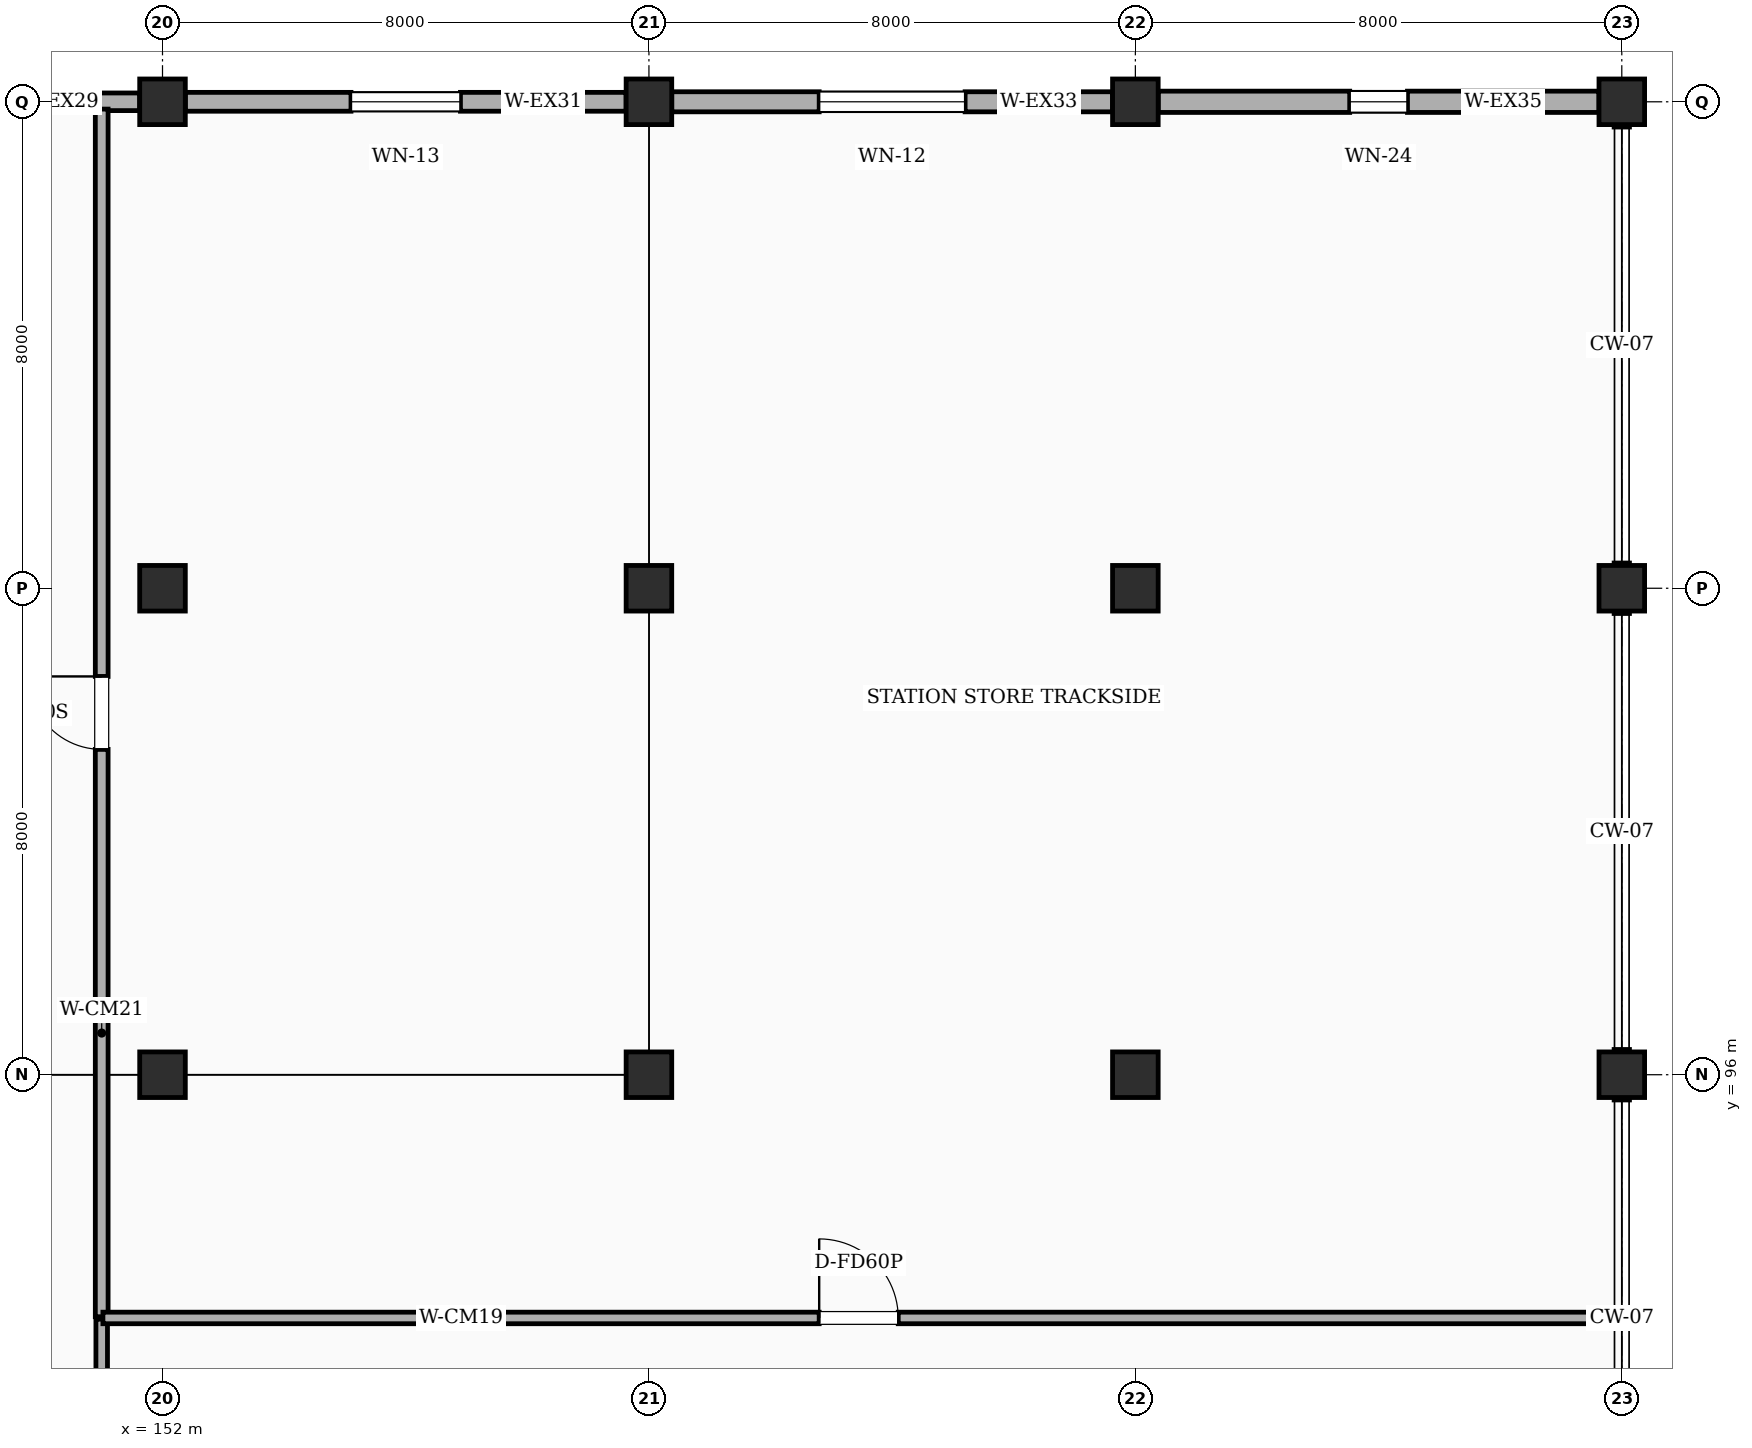
"""IFC4 building model, lengths in metres.
Left out: names, types, materials, properties, quantities, classifications, styles, units other than length and angle.
Written with IfcOpenShell. Run it as: python <this file> out.ifc"""

import sys

from ifc_helpers import new_model, si_unit, direction, frame, frame_2d, origin, origin_2d, place, context, subcontext, project, spatial, rectangle, extrude, element, fill, save


model = new_model("IFC4")
c1 = context("Model", 3, precision=1e-05, world=origin(), true_north=direction((0.0, 1.0)))
c2 = subcontext(c1, "Body", "Model", "MODEL_VIEW")
j1 = project(units=[si_unit("LENGTHUNIT", "METRE"), si_unit("PLANEANGLEUNIT", "RADIAN")], contexts=[c1])
p1 = place(None, origin())
s1 = spatial("IfcSite", under=j1, at=p1, CompositionType="ELEMENT")
p2 = place(p1, origin())
s2 = spatial("IfcBuilding", under=s1, at=p2, CompositionType="ELEMENT")
p3 = place(p2, origin())
s3 = spatial("IfcBuildingStorey", under=s2, at=p3, CompositionType="ELEMENT", Elevation=0.0)
for number, where, z_axis, x_axis in (
    (1, (152.0, 96.0, 0.0), (0.0, 0.0, 1.0), (1.0, 0.0, 0.0)),
    (2, (152.0, 104.0, 0.0), (0.0, 0.0, 1.0), (1.0, 0.0, 0.0)),
    (3, (152.0, 112.0, 0.0), (0.0, 0.0, 1.0), (1.0, 0.0, 0.0)),
    (4, (160.0, 96.0, 0.0), (0.0, 0.0, 1.0), (1.0, 0.0, 0.0)),
    (5, (160.0, 104.0, 0.0), (0.0, 0.0, 1.0), (1.0, 0.0, 0.0)),
    (6, (160.0, 112.0, 0.0), (0.0, 0.0, 1.0), (1.0, 0.0, 0.0)),
    (7, (168.0, 96.0, 0.0), (0.0, 0.0, 1.0), (1.0, 0.0, 0.0)),
    (8, (168.0, 104.0, 0.0), (0.0, 0.0, 1.0), (1.0, 0.0, 0.0)),
    (9, (168.0, 112.0, 0.0), (0.0, 0.0, 1.0), (1.0, 0.0, 0.0)),
    (10, (176.0, 96.0, 0.0), (0.0, 0.0, 1.0), (1.0, 0.0, 0.0)),
    (11, (176.0, 104.0, 0.0), (0.0, 0.0, 1.0), (1.0, 0.0, 0.0)),
    (12, (176.0, 112.0, 0.0), (0.0, 0.0, 1.0), (1.0, 0.0, 0.0)),
):
    element("IfcColumn", number, at=place(p3, frame(where, z_axis=z_axis, x_axis=x_axis)), inside=s3, PredefinedType="COLUMN", context=c2, shape_type="SweptSolid", body=[
        extrude(rectangle(XDim=0.75, YDim=0.75, at=origin_2d()), origin(), (0.0, 0.0, 1.0), 5.4),
    ])
p4 = place(p3, frame((175.625, 112.0, 0.0), z_axis=(0.0, 0.0, 1.0), x_axis=(-1.0, 0.0, 0.0)))
e13 = element("IfcWall", 13, at=p4, inside=s3, PredefinedType="STANDARD", context=c2, shape_type="SweptSolid", body=[
    extrude(rectangle(XDim=7.25, YDim=0.35, at=frame_2d((3.625, 0.0))), origin(), (0.0, 0.0, 1.0), 5.1),
])
p5 = place(p4, frame((3.15, 0.0, 0.95)))
e14 = element("IfcOpeningElement", 14, at=p5, cuts=e13, PredefinedType="OPENING", context=c2, shape_type="SweptSolid", body=[
    extrude(rectangle(XDim=0.95, YDim=2.1, at=frame_2d((0.475, 1.05))), frame((0.0, 0.185, 0.0), z_axis=(0.0, -1.0, 0.0), x_axis=(1.0, 0.0, 0.0)), (0.0, 0.0, 1.0), 0.37),
])
p6 = place(p3, frame((167.625, 112.0, 0.0), z_axis=(0.0, 0.0, 1.0), x_axis=(-1.0, 0.0, 0.0)))
e15 = element("IfcWall", 15, at=p6, inside=s3, PredefinedType="STANDARD", context=c2, shape_type="SweptSolid", body=[
    extrude(rectangle(XDim=7.25, YDim=0.33, at=frame_2d((3.625, 0.0))), origin(), (0.0, 0.0, 1.0), 5.1),
])
p7 = place(p6, frame((2.425, 0.0, 0.95)))
e16 = element("IfcOpeningElement", 16, at=p7, cuts=e15, PredefinedType="OPENING", context=c2, shape_type="SweptSolid", body=[
    extrude(rectangle(XDim=2.4, YDim=1.85, at=frame_2d((1.2, 0.925))), frame((0.0, 0.175, 0.0), z_axis=(0.0, -1.0, 0.0), x_axis=(1.0, 0.0, 0.0)), (0.0, 0.0, 1.0), 0.35),
])
p8 = place(p3, frame((159.625, 112.0, 0.0), z_axis=(0.0, 0.0, 1.0), x_axis=(-1.0, 0.0, 0.0)))
e17 = element("IfcWall", 17, at=p8, inside=s3, PredefinedType="STANDARD", context=c2, shape_type="SweptSolid", body=[
    extrude(rectangle(XDim=7.25, YDim=0.31, at=frame_2d((3.625, 0.0))), origin(), (0.0, 0.0, 1.0), 5.1),
])
p9 = place(p8, frame((2.725, 0.0, 0.95)))
e18 = element("IfcOpeningElement", 18, at=p9, cuts=e17, PredefinedType="OPENING", context=c2, shape_type="SweptSolid", body=[
    extrude(rectangle(XDim=1.8, YDim=1.85, at=frame_2d((0.9, 0.925))), frame((0.0, 0.165, 0.0), z_axis=(0.0, -1.0, 0.0), x_axis=(1.0, 0.0, 0.0)), (0.0, 0.0, 1.0), 0.33),
])
p10 = place(p3, frame((151.625, 112.0, 0.0), z_axis=(0.0, 0.0, 1.0), x_axis=(-1.0, 0.0, 0.0)))
e19 = element("IfcWall", 19, at=p10, inside=s3, PredefinedType="STANDARD", context=c2, shape_type="SweptSolid", body=[
    extrude(rectangle(XDim=6.2, YDim=0.29, at=frame_2d((3.1, 0.0))), origin(), (0.0, 0.0, 1.0), 5.1),
])
p11 = place(p10, frame((2.625, 0.0, 0.95)))
e20 = element("IfcOpeningElement", 20, at=p11, cuts=e19, PredefinedType="OPENING", context=c2, shape_type="SweptSolid", body=[
    extrude(rectangle(XDim=0.95, YDim=2.1, at=frame_2d((0.475, 1.05))), frame((0.0, 0.155, 0.0), z_axis=(0.0, -1.0, 0.0), x_axis=(1.0, 0.0, 0.0)), (0.0, 0.0, 1.0), 0.31),
])
p12 = place(p3, frame((151.0, 64.02, 0.0), z_axis=(0.0, 0.0, 1.0), x_axis=(0.0, 1.0, 0.0)))
e21 = element("IfcWall", 21, at=p12, inside=s3, PredefinedType="SOLIDWALL", context=c2, shape_type="SweptSolid", body=[
    extrude(rectangle(XDim=27.96, YDim=0.19, at=frame_2d((13.98, 0.0))), origin(), (0.0, 0.0, 1.0), 4.27),
])
p13 = place(p12, frame((10.131, 0.0, 0.0)))
e22 = element("IfcOpeningElement", 22, at=p13, cuts=e21, PredefinedType="OPENING", context=c2, shape_type="SweptSolid", body=[
    extrude(rectangle(XDim=1.3, YDim=2.2, at=frame_2d((0.65, 1.1))), frame((0.0, 0.105, 0.0), z_axis=(0.0, -1.0, 0.0), x_axis=(1.0, 0.0, 0.0)), (0.0, 0.0, 1.0), 0.21),
])
p14 = place(p3, frame((151.0, 92.02, 0.0), z_axis=(0.0, 0.0, 1.0), x_axis=(0.0, 1.0, 0.0)))
e23 = element("IfcWall", 23, at=p14, inside=s3, PredefinedType="SOLIDWALL", context=c2, shape_type="SweptSolid", body=[
    extrude(rectangle(XDim=19.86, YDim=0.21, at=frame_2d((9.93, 0.0))), origin(), (0.0, 0.0, 1.0), 4.42),
])
p15 = place(p14, frame((9.33, 0.0, 0.0)))
e24 = element("IfcOpeningElement", 24, at=p15, cuts=e23, PredefinedType="OPENING", context=c2, shape_type="SweptSolid", body=[
    extrude(rectangle(XDim=1.2, YDim=2.15, at=frame_2d((0.6, 1.075))), frame((0.0, 0.115, 0.0), z_axis=(0.0, -1.0, 0.0), x_axis=(1.0, 0.0, 0.0)), (0.0, 0.0, 1.0), 0.23),
])
p16 = place(p3, frame((151.02, 92.0, 0.0), z_axis=(0.0, 0.0, 1.0), x_axis=(1.0, 0.0, 0.0)))
e25 = element("IfcWall", 25, at=p16, inside=s3, PredefinedType="SOLIDWALL", context=c2, shape_type="SweptSolid", body=[
    extrude(rectangle(XDim=24.86, YDim=0.19, at=frame_2d((12.43, 0.0))), origin(), (0.0, 0.0, 1.0), 4.27),
])
p17 = place(p16, frame((11.78, 0.0, 0.0)))
e26 = element("IfcOpeningElement", 26, at=p17, cuts=e25, PredefinedType="OPENING", context=c2, shape_type="SweptSolid", body=[
    extrude(rectangle(XDim=1.3, YDim=2.2, at=frame_2d((0.65, 1.1))), frame((0.0, 0.105, 0.0), z_axis=(0.0, -1.0, 0.0), x_axis=(1.0, 0.0, 0.0)), (0.0, 0.0, 1.0), 0.21),
])
p18 = place(p5, origin())
e27 = element("IfcWindow", 27, at=p18, inside=s3, PartitioningType="SINGLE_PANEL", PredefinedType="WINDOW", context=c2, shape_type="SweptSolid", body=[
    extrude(rectangle(XDim=0.95, YDim=2.1, at=frame_2d((0.475, 1.05))), frame((0.0, 0.03, 0.0), z_axis=(0.0, -1.0, 0.0), x_axis=(1.0, 0.0, 0.0)), (0.0, 0.0, 1.0), 0.06),
])
fill(e14, e27)
p19 = place(p7, origin())
e28 = element("IfcWindow", 28, at=p19, inside=s3, PartitioningType="SINGLE_PANEL", PredefinedType="WINDOW", context=c2, shape_type="SweptSolid", body=[
    extrude(rectangle(XDim=2.4, YDim=1.85, at=frame_2d((1.2, 0.925))), frame((0.0, 0.03, 0.0), z_axis=(0.0, -1.0, 0.0), x_axis=(1.0, 0.0, 0.0)), (0.0, 0.0, 1.0), 0.06),
])
fill(e16, e28)
p20 = place(p9, origin())
e29 = element("IfcWindow", 29, at=p20, inside=s3, PartitioningType="SINGLE_PANEL", PredefinedType="WINDOW", context=c2, shape_type="SweptSolid", body=[
    extrude(rectangle(XDim=1.8, YDim=1.85, at=frame_2d((0.9, 0.925))), frame((0.0, 0.03, 0.0), z_axis=(0.0, -1.0, 0.0), x_axis=(1.0, 0.0, 0.0)), (0.0, 0.0, 1.0), 0.06),
])
fill(e18, e29)
p21 = place(p15, origin())
e30 = element("IfcDoor", 30, at=p21, inside=s3, OperationType="SINGLE_SWING_RIGHT", PredefinedType="DOOR", context=c2, shape_type="SweptSolid", body=[
    extrude(rectangle(XDim=1.2, YDim=2.15, at=frame_2d((0.6, 1.075))), frame((0.0, 0.025, 0.0), z_axis=(0.0, -1.0, 0.0), x_axis=(1.0, 0.0, 0.0)), (0.0, 0.0, 1.0), 0.05),
])
fill(e24, e30)
p22 = place(p17, origin())
e31 = element("IfcDoor", 31, at=p22, inside=s3, OperationType="SINGLE_SWING_LEFT", PredefinedType="DOOR", context=c2, shape_type="SweptSolid", body=[
    extrude(rectangle(XDim=1.3, YDim=2.2, at=frame_2d((0.65, 1.1))), frame((0.0, 0.025, 0.0), z_axis=(0.0, -1.0, 0.0), x_axis=(1.0, 0.0, 0.0)), (0.0, 0.0, 1.0), 0.05),
])
fill(e26, e31)
save(model, sys.argv[1])
